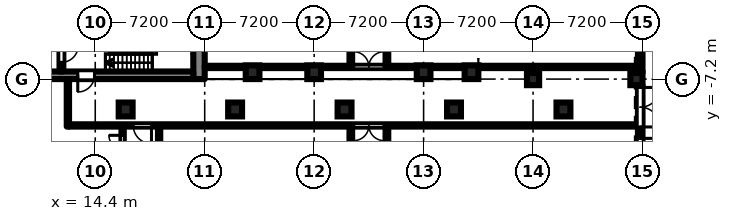
"""IFC4 building model, lengths in metres.
Left out: names, types, materials, properties, quantities, classifications, styles, units other than length and angle.
Written with IfcOpenShell. Run it as: python <this file> out.ifc"""

import sys

from ifc_helpers import new_model, si_unit, direction, frame, frame_2d, origin, origin_2d, place, context, subcontext, project, spatial, rectangle, hollow_circle, extrude, element, fill, save


model = new_model("IFC4")
c1 = context("Model", 3, precision=1e-05, world=origin(), true_north=direction((0.0, 1.0)))
c2 = subcontext(c1, "Body", "Model", "MODEL_VIEW")
j1 = project(units=[si_unit("LENGTHUNIT", "METRE"), si_unit("PLANEANGLEUNIT", "RADIAN")], contexts=[c1])
p1 = place(None, origin())
s1 = spatial("IfcSite", under=j1, at=p1, CompositionType="ELEMENT")
p2 = place(p1, origin())
s2 = spatial("IfcBuilding", under=s1, at=p2, CompositionType="ELEMENT")
p3 = place(p2, origin())
s3 = spatial("IfcBuildingStorey", under=s2, at=p3, CompositionType="ELEMENT", Elevation=0.0)
for number, where, z_axis, x_axis in (
    (1, (24.75, -6.75, 0.0), (0.0, 0.0, 1.0), (1.0, 0.0, 0.0)),
    (2, (28.8, -6.75, 0.0), (0.0, 0.0, 1.0), (1.0, 0.0, 0.0)),
    (3, (36.0, -6.75, 0.0), (0.0, 0.0, 1.0), (1.0, 0.0, 0.0)),
    (4, (39.15, -6.75, 0.0), (0.0, 0.0, 1.0), (1.0, 0.0, 0.0)),
):
    element("IfcColumn", number, at=place(p3, frame(where, z_axis=z_axis, x_axis=x_axis)), inside=s3, PredefinedType="COLUMN", context=c2, shape_type="SweptSolid", body=[
        extrude(rectangle(XDim=0.9, YDim=0.9, at=origin_2d()), origin(), (0.0, 0.0, 1.0), 7.2),
    ])
for number, where, z_axis, x_axis in (
    (5, (43.2, -7.2, 0.0), (0.0, 0.0, 1.0), (1.0, 0.0, 0.0)),
    (6, (50.0, -7.2, 0.0), (0.0, 0.0, 1.0), (1.0, 0.0, 0.0)),
):
    element("IfcColumn", number, at=place(p3, frame(where, z_axis=z_axis, x_axis=x_axis)), inside=s3, PredefinedType="COLUMN", context=c2, shape_type="SweptSolid", body=[
        extrude(rectangle(XDim=0.8, YDim=0.8, at=origin_2d()), origin(), (0.0, 0.0, 1.0), 6.6),
    ])
for number, where, z_axis, x_axis in (
    (7, (16.4, -9.2, 0.0), (0.0, 0.0, 1.0), (1.0, 0.0, 0.0)),
    (8, (23.6, -9.2, 0.0), (0.0, 0.0, 1.0), (1.0, 0.0, 0.0)),
    (9, (30.8, -9.2, 0.0), (0.0, 0.0, 1.0), (1.0, 0.0, 0.0)),
    (10, (38.0, -9.2, 0.0), (0.0, 0.0, 1.0), (1.0, 0.0, 0.0)),
    (11, (45.2, -9.2, 0.0), (0.0, 0.0, 1.0), (1.0, 0.0, 0.0)),
):
    element("IfcColumn", number, at=place(p3, frame(where, z_axis=z_axis, x_axis=x_axis)), inside=s3, PredefinedType="COLUMN", context=c2, shape_type="SweptSolid", body=[
        extrude(hollow_circle(Radius=0.457, WallThickness=0.05, at=origin_2d()), origin(), (0.0, 0.0, 1.0), 7.5),
    ])
p4 = place(p3, frame((50.25, -14.0, 0.0), z_axis=(0.0, 0.0, 1.0), x_axis=(0.0, 1.0, 0.0)))
e12 = element("IfcWall", 12, at=p4, inside=s3, PredefinedType="SOLIDWALL", context=c2, shape_type="SweptSolid", body=[
    extrude(rectangle(XDim=6.4, YDim=0.3, at=frame_2d((3.2, 0.0))), origin(), (0.0, 0.0, 1.0), 6.6),
])
p5 = place(p4, frame((0.3, 0.0, 0.0)))
e13 = element("IfcOpeningElement", 13, at=p5, cuts=e12, PredefinedType="OPENING", context=c2, shape_type="SweptSolid", body=[
    extrude(rectangle(XDim=2.6, YDim=2.4, at=frame_2d((1.3, 1.2))), frame((0.0, 0.16, 0.0), z_axis=(0.0, -1.0, 0.0), x_axis=(1.0, 0.0, 0.0)), (0.0, 0.0, 1.0), 0.32),
])
p6 = place(p4, frame((3.65, 0.0, 0.0)))
e14 = element("IfcOpeningElement", 14, at=p6, cuts=e12, PredefinedType="OPENING", context=c2, shape_type="SweptSolid", body=[
    extrude(rectangle(XDim=2.6, YDim=2.4, at=frame_2d((1.3, 1.2))), frame((0.0, 0.16, 0.0), z_axis=(0.0, -1.0, 0.0), x_axis=(1.0, 0.0, 0.0)), (0.0, 0.0, 1.0), 0.32),
])
p7 = place(p3, frame((50.25, -6.8, 0.0), z_axis=(0.0, 0.0, 1.0), x_axis=(0.0, 1.0, 0.0)))
e15 = element("IfcWall", 15, at=p7, inside=s3, PredefinedType="SOLIDWALL", context=c2, shape_type="SweptSolid", body=[
    extrude(rectangle(XDim=6.4, YDim=0.3, at=frame_2d((3.2, 0.0))), origin(), (0.0, 0.0, 1.0), 6.6),
])
p8 = place(p7, frame((3.45, 0.0, 0.0)))
e16 = element("IfcOpeningElement", 16, at=p8, cuts=e15, PredefinedType="OPENING", context=c2, shape_type="SweptSolid", body=[
    extrude(rectangle(XDim=1.3, YDim=2.1, at=frame_2d((0.65, 1.05))), frame((0.0, 0.16, 0.0), z_axis=(0.0, -1.0, 0.0), x_axis=(1.0, 0.0, 0.0)), (0.0, 0.0, 1.0), 0.32),
])
p9 = place(p3, frame((21.225, -7.2, 0.0), z_axis=(0.0, 0.0, 1.0), x_axis=(0.0, 1.0, 0.0)))
e17 = element("IfcWall", 17, at=p9, inside=s3, PredefinedType="SHEAR", context=c2, shape_type="SweptSolid", body=[
    extrude(rectangle(XDim=14.4, YDim=0.75, at=frame_2d((7.2, 0.0))), origin(), (0.0, 0.0, 1.0), 6.6),
])
p10 = place(p9, frame((6.0, 0.0, 0.0)))
e18 = element("IfcOpeningElement", 18, at=p10, cuts=e17, PredefinedType="OPENING", context=c2, shape_type="SweptSolid", body=[
    extrude(rectangle(XDim=2.4, YDim=2.2, at=frame_2d((1.2, 1.1))), frame((0.0, 0.385, 0.0), z_axis=(0.0, -1.0, 0.0), x_axis=(1.0, 0.0, 0.0)), (0.0, 0.0, 1.0), 0.77),
])
p11 = place(p3, frame((7.9, -6.95, 0.0), z_axis=(0.0, 0.0, 1.0), x_axis=(1.0, 0.0, 0.0)))
e19 = element("IfcWall", 19, at=p11, inside=s3, PredefinedType="SHEAR", context=c2, shape_type="SweptSolid", body=[
    extrude(rectangle(XDim=12.95, YDim=0.5, at=frame_2d((6.475, 0.0))), origin(), (0.0, 0.0, 1.0), 6.6),
])
p12 = place(p11, frame((5.35, 0.0, 0.0)))
e20 = element("IfcOpeningElement", 20, at=p12, cuts=e19, PredefinedType="OPENING", context=c2, shape_type="SweptSolid", body=[
    extrude(rectangle(XDim=1.1, YDim=2.1, at=frame_2d((0.55, 1.05))), frame((0.0, 0.26, 0.0), z_axis=(0.0, -1.0, 0.0), x_axis=(1.0, 0.0, 0.0)), (0.0, 0.0, 1.0), 0.52),
])
p13 = place(p3, frame((12.175, -2.05, 0.0), z_axis=(0.0, 0.0, 1.0), x_axis=(0.0, -1.0, 0.0)))
e21 = element("IfcWall", 21, at=p13, inside=s3, PredefinedType="SHEAR", context=c2, shape_type="SweptSolid", body=[
    extrude(rectangle(XDim=4.65, YDim=0.25, at=frame_2d((2.325, 0.0))), origin(), (0.0, 0.0, 1.0), 6.6),
])
p14 = place(p13, frame((2.95, 0.0, 0.0)))
e22 = element("IfcOpeningElement", 22, at=p14, cuts=e21, PredefinedType="OPENING", context=c2, shape_type="SweptSolid", body=[
    extrude(rectangle(XDim=1.1, YDim=2.1, at=frame_2d((0.55, 1.05))), frame((0.0, 0.135, 0.0), z_axis=(0.0, -1.0, 0.0), x_axis=(1.0, 0.0, 0.0)), (0.0, 0.0, 1.0), 0.27),
])
p15 = place(p3, frame((12.6, -10.325, 0.0), z_axis=(0.0, 0.0, 1.0), x_axis=(0.0, 1.0, 0.0)))
e23 = element("IfcWall", 23, at=p15, inside=s3, PredefinedType="PARTITIONING", context=c2, shape_type="SweptSolid", body=[
    extrude(rectangle(XDim=3.125, YDim=0.15, at=frame_2d((1.562, 0.0))), origin(), (0.0, 0.0, 1.0), 6.6),
])
p16 = place(p3, frame((12.675, -10.25, 0.0), z_axis=(0.0, 0.0, 1.0), x_axis=(1.0, 0.0, 0.0)))
e24 = element("IfcWall", 24, at=p16, inside=s3, PredefinedType="PARTITIONING", context=c2, shape_type="SweptSolid", body=[
    extrude(rectangle(XDim=37.545, YDim=0.15, at=frame_2d((18.772, 0.0))), origin(), (0.0, 0.0, 1.0), 6.6),
])
p17 = place(p16, frame((4.225, 0.0, 0.0)))
e25 = element("IfcOpeningElement", 25, at=p17, cuts=e24, PredefinedType="OPENING", context=c2, shape_type="SweptSolid", body=[
    extrude(rectangle(XDim=1.2, YDim=2.1, at=frame_2d((0.6, 1.05))), frame((0.0, 0.085, 0.0), z_axis=(0.0, -1.0, 0.0), x_axis=(1.0, 0.0, 0.0)), (0.0, 0.0, 1.0), 0.17),
])
p18 = place(p16, frame((18.725, 0.0, 0.0)))
e26 = element("IfcOpeningElement", 26, at=p18, cuts=e24, PredefinedType="OPENING", context=c2, shape_type="SweptSolid", body=[
    extrude(rectangle(XDim=2.0, YDim=2.1, at=frame_2d((1.0, 1.05))), frame((0.0, 0.085, 0.0), z_axis=(0.0, -1.0, 0.0), x_axis=(1.0, 0.0, 0.0)), (0.0, 0.0, 1.0), 0.17),
])
p19 = place(p3, frame((16.2, -16.725, 0.0), z_axis=(0.0, 0.0, 1.0), x_axis=(0.0, 1.0, 0.0)))
e27 = element("IfcWall", 27, at=p19, inside=s3, PredefinedType="PARTITIONING", context=c2, shape_type="SweptSolid", body=[
    extrude(rectangle(XDim=6.4, YDim=0.15, at=frame_2d((3.2, 0.0))), origin(), (0.0, 0.0, 1.0), 6.6),
])
p20 = place(p19, frame((0.575, 0.0, 0.0)))
e28 = element("IfcOpeningElement", 28, at=p20, cuts=e27, PredefinedType="OPENING", context=c2, shape_type="SweptSolid", body=[
    extrude(rectangle(XDim=1.2, YDim=2.1, at=frame_2d((0.6, 1.05))), frame((0.0, 0.085, 0.0), z_axis=(0.0, -1.0, 0.0), x_axis=(1.0, 0.0, 0.0)), (0.0, 0.0, 1.0), 0.17),
])
p21 = place(p19, frame((4.925, 0.0, 0.0)))
e29 = element("IfcOpeningElement", 29, at=p21, cuts=e27, PredefinedType="OPENING", context=c2, shape_type="SweptSolid", body=[
    extrude(rectangle(XDim=0.9, YDim=2.1, at=frame_2d((0.45, 1.05))), frame((0.0, 0.085, 0.0), z_axis=(0.0, -1.0, 0.0), x_axis=(1.0, 0.0, 0.0)), (0.0, 0.0, 1.0), 0.17),
])
p22 = place(p3, frame((18.6, -16.875, 0.0), z_axis=(0.0, 0.0, 1.0), x_axis=(0.0, 1.0, 0.0)))
e30 = element("IfcWall", 30, at=p22, inside=s3, PredefinedType="PARTITIONING", context=c2, shape_type="SweptSolid", body=[
    extrude(rectangle(XDim=6.55, YDim=0.15, at=frame_2d((3.275, 0.0))), origin(), (0.0, 0.0, 1.0), 6.6),
])
p23 = place(p22, frame((1.325, 0.0, 0.0)))
e31 = element("IfcOpeningElement", 31, at=p23, cuts=e30, PredefinedType="OPENING", context=c2, shape_type="SweptSolid", body=[
    extrude(rectangle(XDim=1.8, YDim=2.1, at=frame_2d((0.9, 1.05))), frame((0.0, 0.085, 0.0), z_axis=(0.0, -1.0, 0.0), x_axis=(1.0, 0.0, 0.0)), (0.0, 0.0, 1.0), 0.17),
])
p24 = place(p3, frame((21.6, -6.4, 0.0), z_axis=(0.0, 0.0, 1.0), x_axis=(1.0, 0.0, 0.0)))
e32 = element("IfcWall", 32, at=p24, inside=s3, PredefinedType="PARTITIONING", context=c2, shape_type="SweptSolid", body=[
    extrude(rectangle(XDim=28.62, YDim=0.15, at=frame_2d((14.31, 0.0))), origin(), (0.0, 0.0, 1.0), 6.6),
])
p25 = place(p24, frame((9.8, 0.0, 0.0)))
e33 = element("IfcOpeningElement", 33, at=p25, cuts=e32, PredefinedType="OPENING", context=c2, shape_type="SweptSolid", body=[
    extrude(rectangle(XDim=2.0, YDim=2.1, at=frame_2d((1.0, 1.05))), frame((0.0, 0.085, 0.0), z_axis=(0.0, -1.0, 0.0), x_axis=(1.0, 0.0, 0.0)), (0.0, 0.0, 1.0), 0.17),
])
p26 = place(p3, frame((31.2, -16.725, 0.0), z_axis=(0.0, 0.0, 1.0), x_axis=(0.0, 1.0, 0.0)))
e34 = element("IfcWall", 34, at=p26, inside=s3, PredefinedType="PARTITIONING", context=c2, shape_type="SweptSolid", body=[
    extrude(rectangle(XDim=6.4, YDim=0.15, at=frame_2d((3.2, 0.0))), origin(), (0.0, 0.0, 1.0), 6.6),
])
p27 = place(p26, frame((3.425, 0.0, 0.0)))
e35 = element("IfcOpeningElement", 35, at=p27, cuts=e34, PredefinedType="OPENING", context=c2, shape_type="SweptSolid", body=[
    extrude(rectangle(XDim=1.8, YDim=2.1, at=frame_2d((0.9, 1.05))), frame((0.0, 0.085, 0.0), z_axis=(0.0, -1.0, 0.0), x_axis=(1.0, 0.0, 0.0)), (0.0, 0.0, 1.0), 0.17),
])
p28 = place(p3, frame((31.2, -6.325, 0.0), z_axis=(0.0, 0.0, 1.0), x_axis=(0.0, 1.0, 0.0)))
e36 = element("IfcWall", 36, at=p28, inside=s3, PredefinedType="PARTITIONING", context=c2, shape_type="SweptSolid", body=[
    extrude(rectangle(XDim=12.65, YDim=0.15, at=frame_2d((6.325, 0.0))), origin(), (0.0, 0.0, 1.0), 6.6),
])
p29 = place(p28, frame((5.325, 0.0, 0.0)))
e37 = element("IfcOpeningElement", 37, at=p29, cuts=e36, PredefinedType="OPENING", context=c2, shape_type="SweptSolid", body=[
    extrude(rectangle(XDim=2.0, YDim=2.1, at=frame_2d((1.0, 1.05))), frame((0.0, 0.085, 0.0), z_axis=(0.0, -1.0, 0.0), x_axis=(1.0, 0.0, 0.0)), (0.0, 0.0, 1.0), 0.17),
])
p30 = place(p28, frame((8.175, 0.0, 0.0)))
e38 = element("IfcOpeningElement", 38, at=p30, cuts=e36, PredefinedType="OPENING", context=c2, shape_type="SweptSolid", body=[
    extrude(rectangle(XDim=0.9, YDim=2.1, at=frame_2d((0.45, 1.05))), frame((0.0, 0.085, 0.0), z_axis=(0.0, -1.0, 0.0), x_axis=(1.0, 0.0, 0.0)), (0.0, 0.0, 1.0), 0.17),
])
p31 = place(p28, frame((2.675, 0.0, 0.0)))
e39 = element("IfcOpeningElement", 39, at=p31, cuts=e36, PredefinedType="OPENING", context=c2, shape_type="SweptSolid", body=[
    extrude(rectangle(XDim=1.8, YDim=2.1, at=frame_2d((0.9, 1.05))), frame((0.0, 0.085, 0.0), z_axis=(0.0, -1.0, 0.0), x_axis=(1.0, 0.0, 0.0)), (0.0, 0.0, 1.0), 0.17),
])
p32 = place(p3, frame((33.6, -31.275, 0.0), z_axis=(0.0, 0.0, 1.0), x_axis=(0.0, 1.0, 0.0)))
e40 = element("IfcWall", 40, at=p32, inside=s3, PredefinedType="PARTITIONING", context=c2, shape_type="SweptSolid", body=[
    extrude(rectangle(XDim=20.95, YDim=0.15, at=frame_2d((10.475, 0.0))), origin(), (0.0, 0.0, 1.0), 6.6),
])
p33 = place(p32, frame((15.725, 0.0, 0.0)))
e41 = element("IfcOpeningElement", 41, at=p33, cuts=e40, PredefinedType="OPENING", context=c2, shape_type="SweptSolid", body=[
    extrude(rectangle(XDim=1.8, YDim=2.1, at=frame_2d((0.9, 1.05))), frame((0.0, 0.085, 0.0), z_axis=(0.0, -1.0, 0.0), x_axis=(1.0, 0.0, 0.0)), (0.0, 0.0, 1.0), 0.17),
])
p34 = place(p32, frame((12.025, 0.0, 0.0)))
e42 = element("IfcOpeningElement", 42, at=p34, cuts=e40, PredefinedType="OPENING", context=c2, shape_type="SweptSolid", body=[
    extrude(rectangle(XDim=1.8, YDim=2.1, at=frame_2d((0.9, 1.05))), frame((0.0, 0.085, 0.0), z_axis=(0.0, -1.0, 0.0), x_axis=(1.0, 0.0, 0.0)), (0.0, 0.0, 1.0), 0.17),
])
p35 = place(p3, frame((33.6, -6.325, 0.0), z_axis=(0.0, 0.0, 1.0), x_axis=(0.0, 1.0, 0.0)))
e43 = element("IfcWall", 43, at=p35, inside=s3, PredefinedType="PARTITIONING", context=c2, shape_type="SweptSolid", body=[
    extrude(rectangle(XDim=4.825, YDim=0.15, at=frame_2d((2.413, 0.0))), origin(), (0.0, 0.0, 1.0), 6.6),
])
p36 = place(p35, frame((2.375, 0.0, 0.0)))
e44 = element("IfcOpeningElement", 44, at=p36, cuts=e43, PredefinedType="OPENING", context=c2, shape_type="SweptSolid", body=[
    extrude(rectangle(XDim=1.8, YDim=2.1, at=frame_2d((0.9, 1.05))), frame((0.0, 0.085, 0.0), z_axis=(0.0, -1.0, 0.0), x_axis=(1.0, 0.0, 0.0)), (0.0, 0.0, 1.0), 0.17),
])
p37 = place(p5, frame((2.6, 0.0, 0.0), z_axis=(0.0, 0.0, 1.0), x_axis=(-1.0, 0.0, 0.0)))
e45 = element("IfcDoor", 45, at=p37, inside=s3, OperationType="DOUBLE_DOOR_DOUBLE_SWING", PredefinedType="DOOR", context=c2, shape_type="SweptSolid", body=[
    extrude(rectangle(XDim=2.6, YDim=2.4, at=frame_2d((1.3, 1.2))), frame((0.0, 0.025, 0.0), z_axis=(0.0, -1.0, 0.0), x_axis=(1.0, 0.0, 0.0)), (0.0, 0.0, 1.0), 0.05),
])
fill(e13, e45)
p38 = place(p6, frame((2.6, 0.0, 0.0), z_axis=(0.0, 0.0, 1.0), x_axis=(-1.0, 0.0, 0.0)))
e46 = element("IfcDoor", 46, at=p38, inside=s3, OperationType="DOUBLE_DOOR_DOUBLE_SWING", PredefinedType="DOOR", context=c2, shape_type="SweptSolid", body=[
    extrude(rectangle(XDim=2.6, YDim=2.4, at=frame_2d((1.3, 1.2))), frame((0.0, 0.025, 0.0), z_axis=(0.0, -1.0, 0.0), x_axis=(1.0, 0.0, 0.0)), (0.0, 0.0, 1.0), 0.05),
])
fill(e14, e46)
p39 = place(p14, origin())
e47 = element("IfcDoor", 47, at=p39, inside=s3, OperationType="SINGLE_SWING_LEFT", PredefinedType="DOOR", context=c2, shape_type="SweptSolid", body=[
    extrude(rectangle(XDim=1.1, YDim=2.1, at=frame_2d((0.55, 1.05))), frame((0.0, 0.025, 0.0), z_axis=(0.0, -1.0, 0.0), x_axis=(1.0, 0.0, 0.0)), (0.0, 0.0, 1.0), 0.05),
])
fill(e22, e47)
p40 = place(p12, frame((1.1, 0.0, 0.0), z_axis=(0.0, 0.0, 1.0), x_axis=(-1.0, 0.0, 0.0)))
e48 = element("IfcDoor", 48, at=p40, inside=s3, OperationType="SINGLE_SWING_RIGHT", PredefinedType="DOOR", context=c2, shape_type="SweptSolid", body=[
    extrude(rectangle(XDim=1.1, YDim=2.1, at=frame_2d((0.55, 1.05))), frame((0.0, 0.025, 0.0), z_axis=(0.0, -1.0, 0.0), x_axis=(1.0, 0.0, 0.0)), (0.0, 0.0, 1.0), 0.05),
])
fill(e20, e48)
p41 = place(p17, frame((1.2, 0.0, 0.0), z_axis=(0.0, 0.0, 1.0), x_axis=(-1.0, 0.0, 0.0)))
e49 = element("IfcDoor", 49, at=p41, inside=s3, OperationType="SINGLE_SWING_LEFT", PredefinedType="DOOR", context=c2, shape_type="SweptSolid", body=[
    extrude(rectangle(XDim=1.2, YDim=2.1, at=frame_2d((0.6, 1.05))), frame((0.0, 0.025, 0.0), z_axis=(0.0, -1.0, 0.0), x_axis=(1.0, 0.0, 0.0)), (0.0, 0.0, 1.0), 0.05),
])
fill(e25, e49)
p42 = place(p18, frame((2.0, 0.0, 0.0), z_axis=(0.0, 0.0, 1.0), x_axis=(-1.0, 0.0, 0.0)))
e50 = element("IfcDoor", 50, at=p42, inside=s3, OperationType="DOUBLE_DOOR_DOUBLE_SWING", PredefinedType="DOOR", context=c2, shape_type="SweptSolid", body=[
    extrude(rectangle(XDim=2.0, YDim=2.1, at=frame_2d((1.0, 1.05))), frame((0.0, 0.025, 0.0), z_axis=(0.0, -1.0, 0.0), x_axis=(1.0, 0.0, 0.0)), (0.0, 0.0, 1.0), 0.05),
])
fill(e26, e50)
p43 = place(p25, origin())
e51 = element("IfcDoor", 51, at=p43, inside=s3, OperationType="DOUBLE_DOOR_DOUBLE_SWING", PredefinedType="DOOR", context=c2, shape_type="SweptSolid", body=[
    extrude(rectangle(XDim=2.0, YDim=2.1, at=frame_2d((1.0, 1.05))), frame((0.0, 0.025, 0.0), z_axis=(0.0, -1.0, 0.0), x_axis=(1.0, 0.0, 0.0)), (0.0, 0.0, 1.0), 0.05),
])
fill(e33, e51)
p44 = place(p21, origin())
e52 = element("IfcDoor", 52, at=p44, inside=s3, OperationType="SINGLE_SWING_RIGHT", PredefinedType="DOOR", context=c2, shape_type="SweptSolid", body=[
    extrude(rectangle(XDim=0.9, YDim=2.1, at=frame_2d((0.45, 1.05))), frame((0.0, 0.025, 0.0), z_axis=(0.0, -1.0, 0.0), x_axis=(1.0, 0.0, 0.0)), (0.0, 0.0, 1.0), 0.05),
])
fill(e29, e52)
save(model, sys.argv[1])
